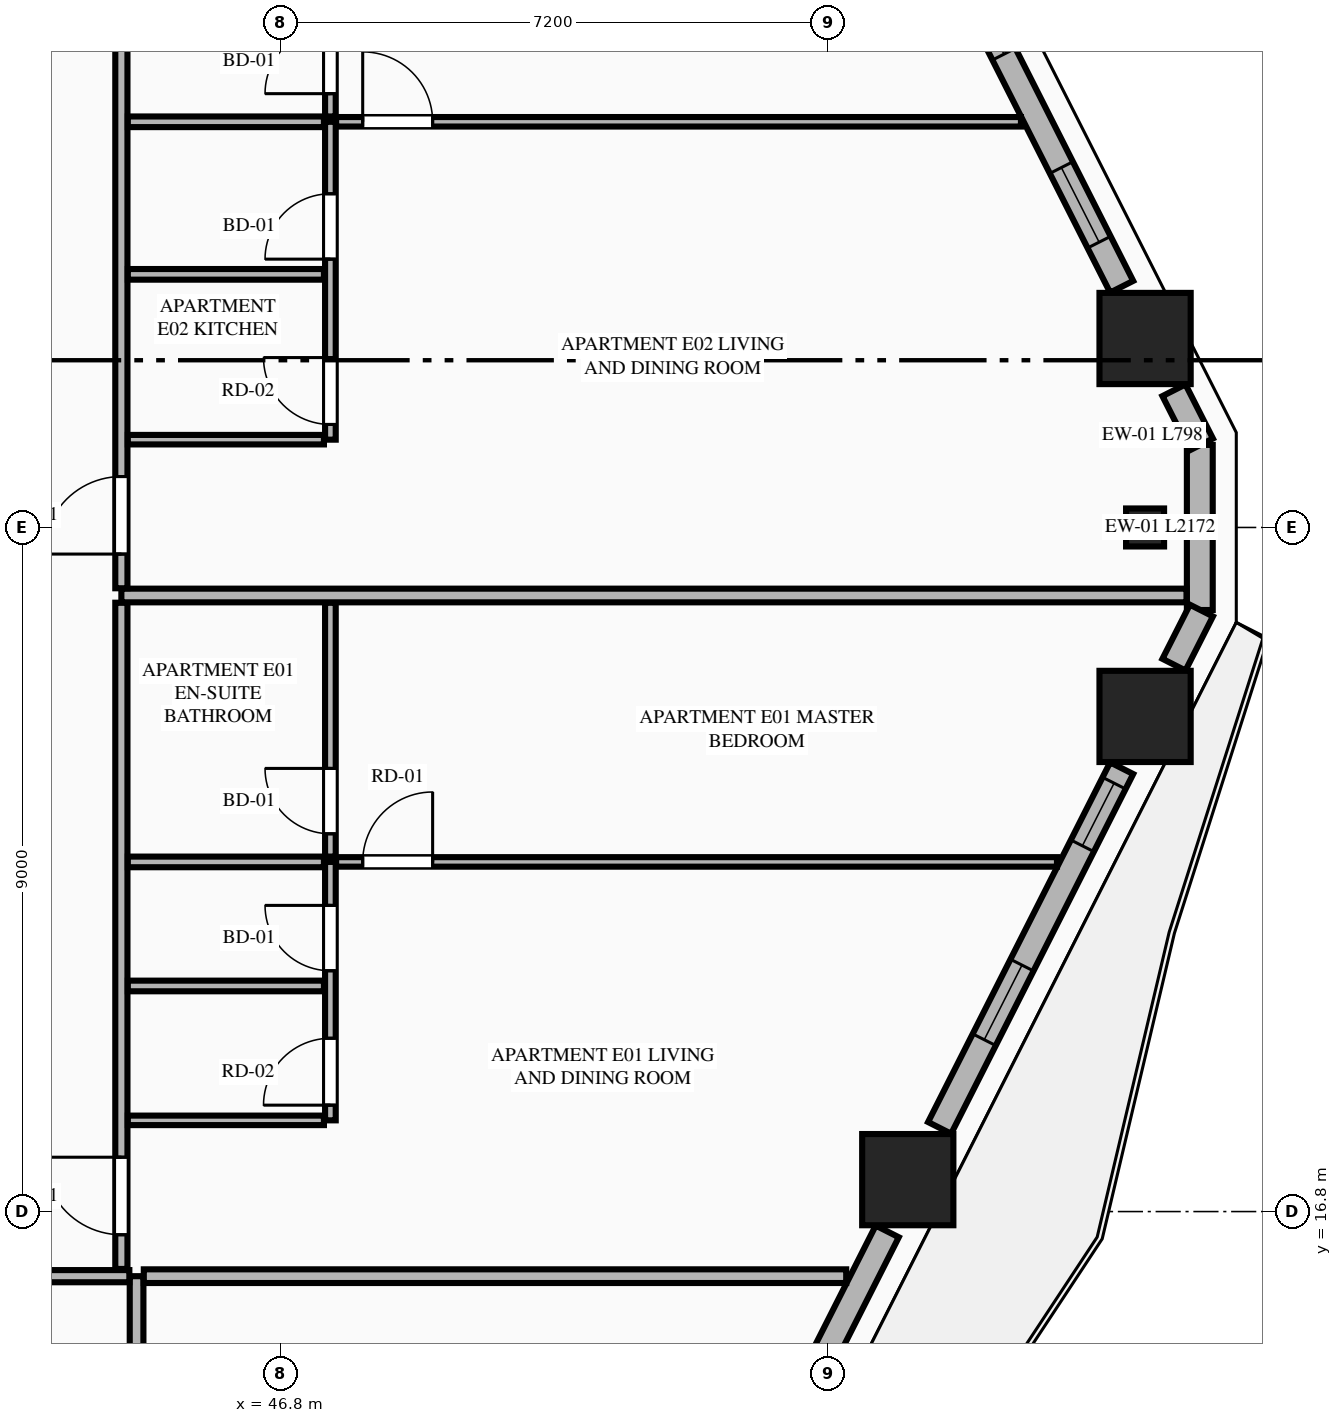
"""IFC4 building model, lengths in metres.
Left out: names, types, materials, properties, quantities, classifications, styles, units other than length and angle.
Written with IfcOpenShell. Run it as: python <this file> out.ifc"""

import sys

from ifc_helpers import new_model, si_unit, direction, frame, frame_2d, origin, origin_2d, place, context, subcontext, project, spatial, rectangle, extrude, element, fill, save


model = new_model("IFC4")
c1 = context("Model", 3, precision=1e-05, world=origin(), true_north=direction((0.0, 1.0)))
c2 = subcontext(c1, "Body", "Model", "MODEL_VIEW")
j1 = project(units=[si_unit("LENGTHUNIT", "METRE"), si_unit("PLANEANGLEUNIT", "RADIAN")], contexts=[c1])
p1 = place(None, origin())
s1 = spatial("IfcSite", under=j1, at=p1, CompositionType="ELEMENT")
p2 = place(p1, origin())
s2 = spatial("IfcBuilding", under=s1, at=p2, CompositionType="ELEMENT")
p3 = place(p2, frame((0.0, 0.0, 71.05)))
s3 = spatial("IfcBuildingStorey", under=s2, at=p3, CompositionType="ELEMENT", Elevation=71.05)
for number, where, z_axis, x_axis in (
    (1, (55.046, 17.22, 0.0), (0.0, 0.0, 1.0), (1.0, 0.0, 0.0)),
    (2, (58.168, 23.314, 0.0), (0.0, 0.0, 1.0), (1.0, 0.0, 0.0)),
    (3, (58.168, 28.286, 0.0), (0.0, 0.0, 1.0), (1.0, 0.0, 0.0)),
):
    element("IfcColumn", number, at=place(p3, frame(where, z_axis=z_axis, x_axis=x_axis)), inside=s3, PredefinedType="COLUMN", context=c2, shape_type="SweptSolid", body=[
        extrude(rectangle(XDim=1.2, YDim=1.2, at=origin_2d()), origin(), (0.0, 0.0, 1.0), 3.55),
    ])
p4 = place(p3, frame((58.168, 25.8, 0.0), z_axis=(0.0, 0.0, 1.0), x_axis=(0.0, 1.0, 0.0)))
e4 = element("IfcColumn", 4, at=p4, inside=s3, PredefinedType="PILASTER", context=c2, shape_type="SweptSolid", body=[
    extrude(rectangle(XDim=0.5, YDim=0.35, at=origin_2d()), origin(), (0.0, 0.0, 1.0), 3.55),
])
p5 = place(p3, frame((58.888, 24.714, 0.0), z_axis=(0.0, 0.0, 1.0), x_axis=(0.0, 1.0, 0.0)))
e5 = element("IfcWall", 5, at=p5, inside=s3, PredefinedType="STANDARD", context=c2, shape_type="SweptSolid", body=[
    extrude(rectangle(XDim=2.172, YDim=0.34, at=frame_2d((1.086, 0.0))), origin(), (0.0, 0.0, 1.0), 3.27),
])
p6 = place(p3, frame((52.271, 11.59, 0.0), z_axis=(0.0, 0.0, 1.0), x_axis=(0.451592100298, 0.892224509273, 0.0)))
e6 = element("IfcWall", 6, at=p6, inside=s3, PredefinedType="STANDARD", context=c2, shape_type="SweptSolid", body=[
    extrude(rectangle(XDim=5.547, YDim=0.34, at=frame_2d((2.773, 0.0))), origin(), (0.0, 0.0, 1.0), 2.652),
])
p7 = place(p6, frame((1.768, 0.0, 0.0)))
e7 = element("IfcOpeningElement", 7, at=p7, cuts=e6, PredefinedType="OPENING", context=c2, shape_type="SweptSolid", body=[
    extrude(rectangle(XDim=1.1, YDim=2.25, at=frame_2d((0.55, 1.125))), frame((0.0, 0.18, 0.0), z_axis=(0.0, -1.0, 0.0), x_axis=(1.0, 0.0, 0.0)), (0.0, 0.0, 1.0), 0.36),
])
p8 = place(p3, frame((55.465, 17.901, 0.0), z_axis=(0.0, 0.0, 1.0), x_axis=(0.451572088722, 0.892234637686, 0.0)))
e8 = element("IfcWall", 8, at=p8, inside=s3, PredefinedType="STANDARD", context=c2, shape_type="SweptSolid", body=[
    extrude(rectangle(XDim=5.304, YDim=0.34, at=frame_2d((2.652, 0.0))), origin(), (0.0, 0.0, 1.0), 2.652),
])
p9 = place(p8, frame((1.3, 0.0, 0.75)))
e9 = element("IfcOpeningElement", 9, at=p9, cuts=e8, PredefinedType="OPENING", context=c2, shape_type="SweptSolid", body=[
    extrude(rectangle(XDim=1.1, YDim=1.752, at=frame_2d((0.55, 0.876))), frame((0.0, 0.18, 0.0), z_axis=(0.0, -1.0, 0.0), x_axis=(1.0, 0.0, 0.0)), (0.0, 0.0, 1.0), 0.36),
])
p10 = place(p8, frame((4.159, 0.0, 0.75)))
e10 = element("IfcOpeningElement", 10, at=p10, cuts=e8, PredefinedType="OPENING", context=c2, shape_type="SweptSolid", body=[
    extrude(rectangle(XDim=0.924, YDim=1.752, at=frame_2d((0.462, 0.876))), frame((0.0, 0.18, 0.0), z_axis=(0.0, -1.0, 0.0), x_axis=(1.0, 0.0, 0.0)), (0.0, 0.0, 1.0), 0.36),
])
for number, where, z_axis, x_axis in (
    (11, (58.548, 23.995, 0.0), (0.0, 0.0, 1.0), (0.452, 0.892, 0.0)),
    (12, (58.909, 26.893, 0.0), (0.0, 0.0, 1.0), (-0.452, 0.892, 0.0)),
):
    element("IfcWall", number, at=place(p3, frame(where, z_axis=z_axis, x_axis=x_axis)), inside=s3, PredefinedType="STANDARD", context=c2, shape_type="SweptSolid", body=[
        extrude(rectangle(XDim=0.798, YDim=0.34, at=frame_2d((0.399, 0.0))), origin(), (0.0, 0.0, 1.0), 3.27),
    ])
p11 = place(p3, frame((57.86, 28.967, 0.0), z_axis=(0.0, 0.0, 1.0), x_axis=(-0.451590635984, 0.892225250422, 0.0)))
e13 = element("IfcWall", 13, at=p11, inside=s3, PredefinedType="STANDARD", context=c2, shape_type="SweptSolid", body=[
    extrude(rectangle(XDim=5.303, YDim=0.34, at=frame_2d((2.652, 0.0))), origin(), (0.0, 0.0, 1.0), 2.652),
])
p12 = place(p11, frame((0.657, 0.0, 0.75)))
e14 = element("IfcOpeningElement", 14, at=p12, cuts=e13, PredefinedType="OPENING", context=c2, shape_type="SweptSolid", body=[
    extrude(rectangle(XDim=1.1, YDim=1.752, at=frame_2d((0.55, 0.876))), frame((0.0, 0.18, 0.0), z_axis=(0.0, -1.0, 0.0), x_axis=(1.0, 0.0, 0.0)), (0.0, 0.0, 1.0), 0.36),
])
p13 = place(p11, frame((3.429, 0.0, 0.75)))
e15 = element("IfcOpeningElement", 15, at=p13, cuts=e13, PredefinedType="OPENING", context=c2, shape_type="SweptSolid", body=[
    extrude(rectangle(XDim=1.1, YDim=1.752, at=frame_2d((0.55, 0.876))), frame((0.0, 0.18, 0.0), z_axis=(0.0, -1.0, 0.0), x_axis=(1.0, 0.0, 0.0)), (0.0, 0.0, 1.0), 0.36),
])
p14 = place(p3, frame((44.9, 2.455, 0.0), z_axis=(0.0, 0.0, 1.0), x_axis=(0.0, 1.0, 0.0)))
e16 = element("IfcWall", 16, at=p14, inside=s3, PredefinedType="PARTITIONING", context=c2, shape_type="SweptSolid", body=[
    extrude(rectangle(XDim=13.495, YDim=0.18, at=frame_2d((6.748, 0.0))), origin(), (0.0, 0.0, 1.0), 3.27),
])
p15 = place(p3, frame((19.995, 15.95, 0.0), z_axis=(0.0, 0.0, 1.0), x_axis=(1.0, 0.0, 0.0)))
e17 = element("IfcWall", 17, at=p15, inside=s3, PredefinedType="PARTITIONING", context=c2, shape_type="SweptSolid", body=[
    extrude(rectangle(XDim=24.81, YDim=0.16, at=frame_2d((12.405, 0.0))), origin(), (0.0, 0.0, 1.0), 3.27),
])
p16 = place(p15, frame((0.705, 0.0, 0.0)))
e18 = element("IfcOpeningElement", 18, at=p16, cuts=e17, PredefinedType="OPENING", context=c2, shape_type="SweptSolid", body=[
    extrude(rectangle(XDim=1.35, YDim=2.35, at=frame_2d((0.675, 1.175))), frame((0.0, 0.09, 0.0), z_axis=(0.0, -1.0, 0.0), x_axis=(1.0, 0.0, 0.0)), (0.0, 0.0, 1.0), 0.18),
])
p17 = place(p3, frame((44.995, 15.95, 0.0), z_axis=(0.0, 0.0, 1.0), x_axis=(1.0, 0.0, 0.0)))
e19 = element("IfcWall", 19, at=p17, inside=s3, PredefinedType="PARTITIONING", context=c2, shape_type="SweptSolid", body=[
    extrude(rectangle(XDim=9.241, YDim=0.18, at=frame_2d((4.621, 0.0))), origin(), (0.0, 0.0, 1.0), 3.27),
])
p18 = place(p3, frame((44.7, 16.045, 0.0), z_axis=(0.0, 0.0, 1.0), x_axis=(0.0, 1.0, 0.0)))
e20 = element("IfcWall", 20, at=p18, inside=s3, PredefinedType="PARTITIONING", context=c2, shape_type="SweptSolid", body=[
    extrude(rectangle(XDim=8.765, YDim=0.16, at=frame_2d((4.383, 0.0))), origin(), (0.0, 0.0, 1.0), 2.64),
])
p19 = place(p18, frame((0.45, 0.0, 0.0)))
e21 = element("IfcOpeningElement", 21, at=p19, cuts=e20, PredefinedType="OPENING", context=c2, shape_type="SweptSolid", body=[
    extrude(rectangle(XDim=1.02, YDim=2.25, at=frame_2d((0.51, 1.125))), frame((0.0, 0.09, 0.0), z_axis=(0.0, -1.0, 0.0), x_axis=(1.0, 0.0, 0.0)), (0.0, 0.0, 1.0), 0.18),
])
p20 = place(p3, frame((44.785, 18.0, 0.0), z_axis=(0.0, 0.0, 1.0), x_axis=(1.0, 0.0, 0.0)))
e22 = element("IfcWall", 22, at=p20, inside=s3, PredefinedType="PARTITIONING", context=c2, shape_type="SweptSolid", body=[
    extrude(rectangle(XDim=2.58, YDim=0.125, at=frame_2d((1.29, 0.0))), origin(), (0.0, 0.0, 1.0), 2.64),
])
p21 = place(p3, frame((47.45, 18.0, 0.0), z_axis=(0.0, 0.0, 1.0), x_axis=(0.0, 1.0, 0.0)))
e23 = element("IfcWall", 23, at=p21, inside=s3, PredefinedType="PLUMBINGWALL", context=c2, shape_type="SweptSolid", body=[
    extrude(rectangle(XDim=3.4, YDim=0.14, at=frame_2d((1.7, 0.0))), origin(), (0.0, 0.0, 1.0), 3.27),
])
p22 = place(p21, frame((0.2, 0.0, 0.0)))
e24 = element("IfcOpeningElement", 24, at=p22, cuts=e23, PredefinedType="OPENING", context=c2, shape_type="SweptSolid", body=[
    extrude(rectangle(XDim=0.88, YDim=2.15, at=frame_2d((0.44, 1.075))), frame((0.0, 0.08, 0.0), z_axis=(0.0, -1.0, 0.0), x_axis=(1.0, 0.0, 0.0)), (0.0, 0.0, 1.0), 0.16),
])
p23 = place(p21, frame((1.968, 0.0, 0.0)))
e25 = element("IfcOpeningElement", 25, at=p23, cuts=e23, PredefinedType="OPENING", context=c2, shape_type="SweptSolid", body=[
    extrude(rectangle(XDim=0.86, YDim=2.1, at=frame_2d((0.43, 1.05))), frame((0.0, 0.08, 0.0), z_axis=(0.0, -1.0, 0.0), x_axis=(1.0, 0.0, 0.0)), (0.0, 0.0, 1.0), 0.16),
])
p24 = place(p3, frame((47.45, 21.47, 0.0), z_axis=(0.0, 0.0, 1.0), x_axis=(0.0, 1.0, 0.0)))
e26 = element("IfcWall", 26, at=p24, inside=s3, PredefinedType="PLUMBINGWALL", context=c2, shape_type="SweptSolid", body=[
    extrude(rectangle(XDim=3.34, YDim=0.14, at=frame_2d((1.67, 0.0))), origin(), (0.0, 0.0, 1.0), 3.27),
])
p25 = place(p24, frame((0.3, 0.0, 0.0)))
e27 = element("IfcOpeningElement", 27, at=p25, cuts=e26, PredefinedType="OPENING", context=c2, shape_type="SweptSolid", body=[
    extrude(rectangle(XDim=0.86, YDim=2.1, at=frame_2d((0.43, 1.05))), frame((0.0, 0.08, 0.0), z_axis=(0.0, -1.0, 0.0), x_axis=(1.0, 0.0, 0.0)), (0.0, 0.0, 1.0), 0.16),
])
p26 = place(p3, frame((44.785, 21.4, 0.0), z_axis=(0.0, 0.0, 1.0), x_axis=(1.0, 0.0, 0.0)))
e28 = element("IfcWall", 28, at=p26, inside=s3, PredefinedType="PLUMBINGWALL", context=c2, shape_type="SweptSolid", body=[
    extrude(rectangle(XDim=2.58, YDim=0.14, at=frame_2d((1.29, 0.0))), origin(), (0.0, 0.0, 1.0), 3.27),
])
p27 = place(p3, frame((47.525, 21.4, 0.0), z_axis=(0.0, 0.0, 1.0), x_axis=(1.0, 0.0, 0.0)))
e29 = element("IfcWall", 29, at=p27, inside=s3, PredefinedType="PARTITIONING", context=c2, shape_type="SweptSolid", body=[
    extrude(rectangle(XDim=9.484, YDim=0.125, at=frame_2d((4.742, 0.0))), origin(), (0.0, 0.0, 1.0), 3.27),
])
p28 = place(p27, frame((0.35, 0.0, 0.0)))
e30 = element("IfcOpeningElement", 30, at=p28, cuts=e29, PredefinedType="OPENING", context=c2, shape_type="SweptSolid", body=[
    extrude(rectangle(XDim=0.92, YDim=2.15, at=frame_2d((0.46, 1.075))), frame((0.0, 0.073, 0.0), z_axis=(0.0, -1.0, 0.0), x_axis=(1.0, 0.0, 0.0)), (0.0, 0.0, 1.0), 0.145),
])
p29 = place(p3, frame((44.785, 19.768, 0.0), z_axis=(0.0, 0.0, 1.0), x_axis=(1.0, 0.0, 0.0)))
e31 = element("IfcWall", 31, at=p29, inside=s3, PredefinedType="PLUMBINGWALL", context=c2, shape_type="SweptSolid", body=[
    extrude(rectangle(XDim=2.58, YDim=0.14, at=frame_2d((1.29, 0.0))), origin(), (0.0, 0.0, 1.0), 3.27),
])
p30 = place(p3, frame((44.7, 24.905, 0.0), z_axis=(0.0, 0.0, 1.0), x_axis=(1.0, 0.0, 0.0)))
e32 = element("IfcWall", 32, at=p30, inside=s3, PredefinedType="PARTITIONING", context=c2, shape_type="SweptSolid", body=[
    extrude(rectangle(XDim=14.013, YDim=0.18, at=frame_2d((7.006, 0.0))), origin(), (0.0, 0.0, 1.0), 3.27),
])
p31 = place(p3, frame((44.7, 25.0, 0.0), z_axis=(0.0, 0.0, 1.0), x_axis=(0.0, 1.0, 0.0)))
e33 = element("IfcWall", 33, at=p31, inside=s3, PredefinedType="PARTITIONING", context=c2, shape_type="SweptSolid", body=[
    extrude(rectangle(XDim=10.755, YDim=0.16, at=frame_2d((5.377, 0.0))), origin(), (0.0, 0.0, 1.0), 2.64),
])
p32 = place(p31, frame((0.45, 0.0, 0.0)))
e34 = element("IfcOpeningElement", 34, at=p32, cuts=e33, PredefinedType="OPENING", context=c2, shape_type="SweptSolid", body=[
    extrude(rectangle(XDim=1.02, YDim=2.25, at=frame_2d((0.51, 1.125))), frame((0.0, 0.09, 0.0), z_axis=(0.0, -1.0, 0.0), x_axis=(1.0, 0.0, 0.0)), (0.0, 0.0, 1.0), 0.18),
])
p33 = place(p3, frame((44.785, 26.955, 0.0), z_axis=(0.0, 0.0, 1.0), x_axis=(1.0, 0.0, 0.0)))
e35 = element("IfcWall", 35, at=p33, inside=s3, PredefinedType="PARTITIONING", context=c2, shape_type="SweptSolid", body=[
    extrude(rectangle(XDim=2.58, YDim=0.125, at=frame_2d((1.29, 0.0))), origin(), (0.0, 0.0, 1.0), 3.27),
])
p34 = place(p3, frame((47.45, 26.955, 0.0), z_axis=(0.0, 0.0, 1.0), x_axis=(0.0, 1.0, 0.0)))
e36 = element("IfcWall", 36, at=p34, inside=s3, PredefinedType="PLUMBINGWALL", context=c2, shape_type="SweptSolid", body=[
    extrude(rectangle(XDim=4.182, YDim=0.14, at=frame_2d((2.091, 0.0))), origin(), (0.0, 0.0, 1.0), 3.27),
])
p35 = place(p34, frame((0.2, 0.0, 0.0)))
e37 = element("IfcOpeningElement", 37, at=p35, cuts=e36, PredefinedType="OPENING", context=c2, shape_type="SweptSolid", body=[
    extrude(rectangle(XDim=0.88, YDim=2.15, at=frame_2d((0.44, 1.075))), frame((0.0, 0.08, 0.0), z_axis=(0.0, -1.0, 0.0), x_axis=(1.0, 0.0, 0.0)), (0.0, 0.0, 1.0), 0.16),
])
p36 = place(p34, frame((2.375, 0.0, 0.0)))
e38 = element("IfcOpeningElement", 38, at=p36, cuts=e36, PredefinedType="OPENING", context=c2, shape_type="SweptSolid", body=[
    extrude(rectangle(XDim=0.86, YDim=2.1, at=frame_2d((0.43, 1.05))), frame((0.0, 0.08, 0.0), z_axis=(0.0, -1.0, 0.0), x_axis=(1.0, 0.0, 0.0)), (0.0, 0.0, 1.0), 0.16),
])
p37 = place(p3, frame((47.45, 31.207, 0.0), z_axis=(0.0, 0.0, 1.0), x_axis=(0.0, 1.0, 0.0)))
e39 = element("IfcWall", 39, at=p37, inside=s3, PredefinedType="PLUMBINGWALL", context=c2, shape_type="SweptSolid", body=[
    extrude(rectangle(XDim=4.548, YDim=0.14, at=frame_2d((2.274, 0.0))), origin(), (0.0, 0.0, 1.0), 3.27),
])
p38 = place(p37, frame((0.3, 0.0, 0.0)))
e40 = element("IfcOpeningElement", 40, at=p38, cuts=e39, PredefinedType="OPENING", context=c2, shape_type="SweptSolid", body=[
    extrude(rectangle(XDim=0.86, YDim=2.1, at=frame_2d((0.43, 1.05))), frame((0.0, 0.08, 0.0), z_axis=(0.0, -1.0, 0.0), x_axis=(1.0, 0.0, 0.0)), (0.0, 0.0, 1.0), 0.16),
])
p39 = place(p3, frame((44.785, 31.137, 0.0), z_axis=(0.0, 0.0, 1.0), x_axis=(1.0, 0.0, 0.0)))
e41 = element("IfcWall", 41, at=p39, inside=s3, PredefinedType="PLUMBINGWALL", context=c2, shape_type="SweptSolid", body=[
    extrude(rectangle(XDim=2.58, YDim=0.14, at=frame_2d((1.29, 0.0))), origin(), (0.0, 0.0, 1.0), 3.27),
])
p40 = place(p3, frame((47.525, 31.137, 0.0), z_axis=(0.0, 0.0, 1.0), x_axis=(1.0, 0.0, 0.0)))
e42 = element("IfcWall", 42, at=p40, inside=s3, PredefinedType="PARTITIONING", context=c2, shape_type="SweptSolid", body=[
    extrude(rectangle(XDim=9.01, YDim=0.125, at=frame_2d((4.505, 0.0))), origin(), (0.0, 0.0, 1.0), 3.27),
])
p41 = place(p40, frame((0.35, 0.0, 0.0)))
e43 = element("IfcOpeningElement", 43, at=p41, cuts=e42, PredefinedType="OPENING", context=c2, shape_type="SweptSolid", body=[
    extrude(rectangle(XDim=0.92, YDim=2.15, at=frame_2d((0.46, 1.075))), frame((0.0, 0.073, 0.0), z_axis=(0.0, -1.0, 0.0), x_axis=(1.0, 0.0, 0.0)), (0.0, 0.0, 1.0), 0.145),
])
p42 = place(p3, frame((44.785, 29.13, 0.0), z_axis=(0.0, 0.0, 1.0), x_axis=(1.0, 0.0, 0.0)))
e44 = element("IfcWall", 44, at=p42, inside=s3, PredefinedType="PLUMBINGWALL", context=c2, shape_type="SweptSolid", body=[
    extrude(rectangle(XDim=2.58, YDim=0.14, at=frame_2d((1.29, 0.0))), origin(), (0.0, 0.0, 1.0), 3.27),
])
p43 = place(p9, origin())
e45 = element("IfcWindow", 45, at=p43, inside=s3, PartitioningType="SINGLE_PANEL", PredefinedType="WINDOW", context=c2, shape_type="SweptSolid", body=[
    extrude(rectangle(XDim=1.1, YDim=1.752, at=frame_2d((0.55, 0.876))), frame((0.0, 0.03, 0.0), z_axis=(0.0, -1.0, 0.0), x_axis=(1.0, 0.0, 0.0)), (0.0, 0.0, 1.0), 0.06),
])
fill(e9, e45)
p44 = place(p12, origin())
e46 = element("IfcWindow", 46, at=p44, inside=s3, PartitioningType="SINGLE_PANEL", PredefinedType="WINDOW", context=c2, shape_type="SweptSolid", body=[
    extrude(rectangle(XDim=1.1, YDim=1.752, at=frame_2d((0.55, 0.876))), frame((0.0, 0.03, 0.0), z_axis=(0.0, -1.0, 0.0), x_axis=(1.0, 0.0, 0.0)), (0.0, 0.0, 1.0), 0.06),
])
fill(e14, e46)
p45 = place(p22, origin())
e47 = element("IfcDoor", 47, at=p45, inside=s3, OperationType="SINGLE_SWING_LEFT", PredefinedType="DOOR", context=c2, shape_type="SweptSolid", body=[
    extrude(rectangle(XDim=0.88, YDim=2.15, at=frame_2d((0.44, 1.075))), frame((0.0, 0.025, 0.0), z_axis=(0.0, -1.0, 0.0), x_axis=(1.0, 0.0, 0.0)), (0.0, 0.0, 1.0), 0.05),
])
fill(e24, e47)
p46 = place(p23, origin())
e48 = element("IfcDoor", 48, at=p46, inside=s3, OperationType="SINGLE_SWING_RIGHT", PredefinedType="DOOR", context=c2, shape_type="SweptSolid", body=[
    extrude(rectangle(XDim=0.86, YDim=2.1, at=frame_2d((0.43, 1.05))), frame((0.0, 0.025, 0.0), z_axis=(0.0, -1.0, 0.0), x_axis=(1.0, 0.0, 0.0)), (0.0, 0.0, 1.0), 0.05),
])
fill(e25, e48)
p47 = place(p25, origin())
e49 = element("IfcDoor", 49, at=p47, inside=s3, OperationType="SINGLE_SWING_RIGHT", PredefinedType="DOOR", context=c2, shape_type="SweptSolid", body=[
    extrude(rectangle(XDim=0.86, YDim=2.1, at=frame_2d((0.43, 1.05))), frame((0.0, 0.025, 0.0), z_axis=(0.0, -1.0, 0.0), x_axis=(1.0, 0.0, 0.0)), (0.0, 0.0, 1.0), 0.05),
])
fill(e27, e49)
p48 = place(p19, origin())
e50 = element("IfcDoor", 50, at=p48, inside=s3, OperationType="SINGLE_SWING_RIGHT", PredefinedType="DOOR", context=c2, shape_type="SweptSolid", body=[
    extrude(rectangle(XDim=1.02, YDim=2.25, at=frame_2d((0.51, 1.125))), frame((0.0, 0.025, 0.0), z_axis=(0.0, -1.0, 0.0), x_axis=(1.0, 0.0, 0.0)), (0.0, 0.0, 1.0), 0.05),
])
fill(e21, e50)
p49 = place(p28, origin())
e51 = element("IfcDoor", 51, at=p49, inside=s3, OperationType="SINGLE_SWING_RIGHT", PredefinedType="DOOR", context=c2, shape_type="SweptSolid", body=[
    extrude(rectangle(XDim=0.92, YDim=2.15, at=frame_2d((0.46, 1.075))), frame((0.0, 0.025, 0.0), z_axis=(0.0, -1.0, 0.0), x_axis=(1.0, 0.0, 0.0)), (0.0, 0.0, 1.0), 0.05),
])
fill(e30, e51)
p50 = place(p35, origin())
e52 = element("IfcDoor", 52, at=p50, inside=s3, OperationType="SINGLE_SWING_RIGHT", PredefinedType="DOOR", context=c2, shape_type="SweptSolid", body=[
    extrude(rectangle(XDim=0.88, YDim=2.15, at=frame_2d((0.44, 1.075))), frame((0.0, 0.025, 0.0), z_axis=(0.0, -1.0, 0.0), x_axis=(1.0, 0.0, 0.0)), (0.0, 0.0, 1.0), 0.05),
])
fill(e37, e52)
p51 = place(p36, origin())
e53 = element("IfcDoor", 53, at=p51, inside=s3, OperationType="SINGLE_SWING_LEFT", PredefinedType="DOOR", context=c2, shape_type="SweptSolid", body=[
    extrude(rectangle(XDim=0.86, YDim=2.1, at=frame_2d((0.43, 1.05))), frame((0.0, 0.025, 0.0), z_axis=(0.0, -1.0, 0.0), x_axis=(1.0, 0.0, 0.0)), (0.0, 0.0, 1.0), 0.05),
])
fill(e38, e53)
p52 = place(p38, origin())
e54 = element("IfcDoor", 54, at=p52, inside=s3, OperationType="SINGLE_SWING_LEFT", PredefinedType="DOOR", context=c2, shape_type="SweptSolid", body=[
    extrude(rectangle(XDim=0.86, YDim=2.1, at=frame_2d((0.43, 1.05))), frame((0.0, 0.025, 0.0), z_axis=(0.0, -1.0, 0.0), x_axis=(1.0, 0.0, 0.0)), (0.0, 0.0, 1.0), 0.05),
])
fill(e40, e54)
p53 = place(p32, origin())
e55 = element("IfcDoor", 55, at=p53, inside=s3, OperationType="SINGLE_SWING_LEFT", PredefinedType="DOOR", context=c2, shape_type="SweptSolid", body=[
    extrude(rectangle(XDim=1.02, YDim=2.25, at=frame_2d((0.51, 1.125))), frame((0.0, 0.025, 0.0), z_axis=(0.0, -1.0, 0.0), x_axis=(1.0, 0.0, 0.0)), (0.0, 0.0, 1.0), 0.05),
])
fill(e34, e55)
p54 = place(p41, origin())
e56 = element("IfcDoor", 56, at=p54, inside=s3, OperationType="SINGLE_SWING_LEFT", PredefinedType="DOOR", context=c2, shape_type="SweptSolid", body=[
    extrude(rectangle(XDim=0.92, YDim=2.15, at=frame_2d((0.46, 1.075))), frame((0.0, 0.025, 0.0), z_axis=(0.0, -1.0, 0.0), x_axis=(1.0, 0.0, 0.0)), (0.0, 0.0, 1.0), 0.05),
])
fill(e43, e56)
p55 = place(p10, origin())
e57 = element("IfcWindow", 57, at=p55, inside=s3, PartitioningType="SINGLE_PANEL", PredefinedType="WINDOW", context=c2, shape_type="SweptSolid", body=[
    extrude(rectangle(XDim=0.924, YDim=1.752, at=frame_2d((0.462, 0.876))), frame((0.0, 0.03, 0.0), z_axis=(0.0, -1.0, 0.0), x_axis=(1.0, 0.0, 0.0)), (0.0, 0.0, 1.0), 0.06),
])
fill(e10, e57)
p56 = place(p13, origin())
e58 = element("IfcWindow", 58, at=p56, inside=s3, PartitioningType="SINGLE_PANEL", PredefinedType="WINDOW", context=c2, shape_type="SweptSolid", body=[
    extrude(rectangle(XDim=1.1, YDim=1.752, at=frame_2d((0.55, 0.876))), frame((0.0, 0.03, 0.0), z_axis=(0.0, -1.0, 0.0), x_axis=(1.0, 0.0, 0.0)), (0.0, 0.0, 1.0), 0.06),
])
fill(e15, e58)
save(model, sys.argv[1])
